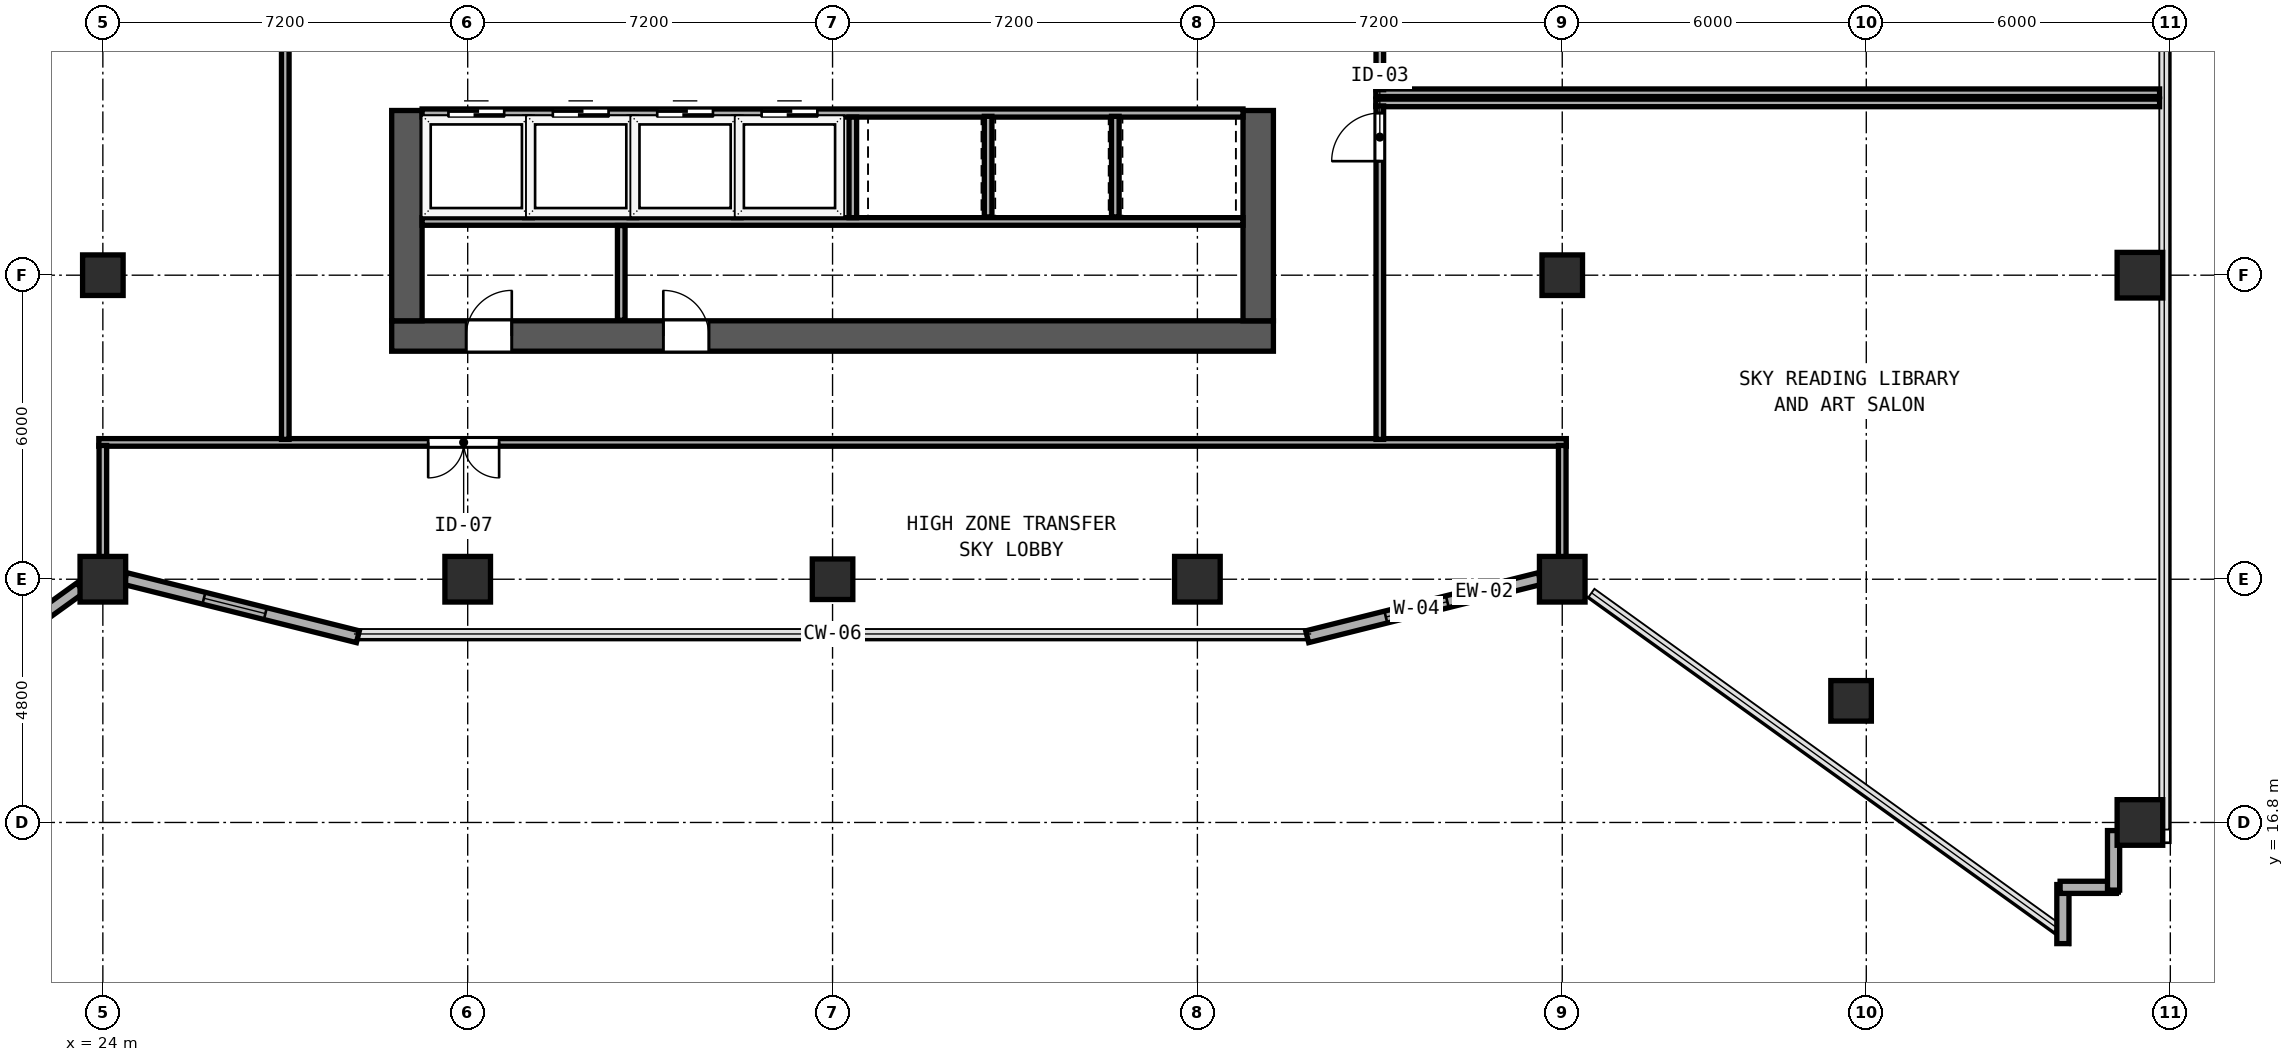
"""IFC4 building model, lengths in metres.
Left out: names, types, materials, properties, quantities, classifications, styles, units other than length and angle.
Written with IfcOpenShell. Run it as: python <this file> out.ifc"""

import sys

from ifc_helpers import new_model, si_unit, direction, frame, frame_2d, origin, origin_2d, place, context, subcontext, project, spatial, rectangle, hollow_rectangle, extrude, element, fill, save


model = new_model("IFC4")
c1 = context("Model", 3, precision=1e-05, world=origin(), true_north=direction((0.0, 1.0)))
c2 = subcontext(c1, "Body", "Model", "MODEL_VIEW")
j1 = project(units=[si_unit("LENGTHUNIT", "METRE"), si_unit("PLANEANGLEUNIT", "RADIAN")], contexts=[c1])
p1 = place(None, origin())
s1 = spatial("IfcSite", under=j1, at=p1, CompositionType="ELEMENT")
p2 = place(p1, origin())
s2 = spatial("IfcBuilding", under=s1, at=p2, CompositionType="ELEMENT")
p3 = place(p2, frame((0.0, 0.0, 164.6)))
s3 = spatial("IfcBuildingStorey", under=s2, at=p3, CompositionType="ELEMENT", Elevation=164.6)
p4 = place(p3, frame((29.7, 26.4, 0.0), z_axis=(0.0, 0.0, 1.0), x_axis=(1.0, 0.0, 0.0)))
e1 = element("IfcWall", 1, at=p4, inside=s3, PredefinedType="SHEAR", context=c2, shape_type="SweptSolid", body=[
    extrude(rectangle(XDim=17.4, YDim=0.6, at=frame_2d((8.7, 0.0))), origin(), (0.0, 0.0, 1.0), 4.22),
])
p5 = place(p4, frame((2.37, 0.0, 0.0), z_axis=(0.0, 0.0, 1.0), x_axis=(-1.0, 0.0, 0.0)))
e2 = element("IfcOpeningElement", 2, at=p5, cuts=e1, PredefinedType="OPENING", context=c2, shape_type="SweptSolid", body=[
    extrude(rectangle(XDim=0.9, YDim=2.1, at=frame_2d((0.45, 1.05))), frame((0.0, 0.31, 0.0), z_axis=(0.0, -1.0, 0.0), x_axis=(1.0, 0.0, 0.0)), (0.0, 0.0, 1.0), 0.62),
])
p6 = place(p4, frame((6.26, 0.0, 0.0), z_axis=(0.0, 0.0, 1.0), x_axis=(-1.0, 0.0, 0.0)))
e3 = element("IfcOpeningElement", 3, at=p6, cuts=e1, PredefinedType="OPENING", context=c2, shape_type="SweptSolid", body=[
    extrude(rectangle(XDim=0.9, YDim=2.1, at=frame_2d((0.45, 1.05))), frame((0.0, 0.31, 0.0), z_axis=(0.0, -1.0, 0.0), x_axis=(1.0, 0.0, 0.0)), (0.0, 0.0, 1.0), 0.62),
])
for number, where, z_axis, x_axis in (
    (4, (30.0, 26.7, 0.0), (0.0, 0.0, 1.0), (0.0, 1.0, 0.0)),
    (5, (46.8, 26.7, 0.0), (0.0, 0.0, 1.0), (0.0, 1.0, 0.0)),
):
    element("IfcWall", number, at=place(p3, frame(where, z_axis=z_axis, x_axis=x_axis)), inside=s3, PredefinedType="SHEAR", context=c2, shape_type="SweptSolid", body=[
        extrude(rectangle(XDim=4.15, YDim=0.6, at=frame_2d((2.075, 0.0))), origin(), (0.0, 0.0, 1.0), 4.22),
    ])
for number, where, z_axis, x_axis in (
    (6, (24.0, 21.6, 0.0), (0.0, 0.0, 1.0), (1.0, 0.0, 0.0)),
    (7, (52.8, 21.6, 0.0), (0.0, 0.0, 1.0), (1.0, 0.0, 0.0)),
    (8, (31.2, 21.6, 0.0), (0.0, 0.0, 1.0), (1.0, 0.0, 0.0)),
    (9, (45.6, 21.6, 0.0), (0.0, 0.0, 1.0), (1.0, 0.0, 0.0)),
    (10, (64.2, 16.8, 0.0), (0.0, 0.0, 1.0), (1.0, 0.0, 0.0)),
    (11, (64.2, 27.6, 0.0), (0.0, 0.0, 1.0), (1.0, 0.0, 0.0)),
):
    element("IfcColumn", number, at=place(p3, frame(where, z_axis=z_axis, x_axis=x_axis)), inside=s3, PredefinedType="COLUMN", context=c2, shape_type="SweptSolid", body=[
        extrude(hollow_rectangle(XDim=0.9, YDim=0.9, WallThickness=0.034, at=origin_2d()), origin(), (0.0, 0.0, 1.0), 4.4),
    ])
for number, where, z_axis, x_axis in (
    (12, (24.0, 27.6, 0.0), (0.0, 0.0, 1.0), (1.0, 0.0, 0.0)),
    (13, (52.8, 27.6, 0.0), (0.0, 0.0, 1.0), (1.0, 0.0, 0.0)),
    (14, (38.4, 21.6, 0.0), (0.0, 0.0, 1.0), (1.0, 0.0, 0.0)),
    (15, (58.5, 19.2, 0.0), (0.0, 0.0, 1.0), (1.0, 0.0, 0.0)),
):
    element("IfcColumn", number, at=place(p3, frame(where, z_axis=z_axis, x_axis=x_axis)), inside=s3, PredefinedType="COLUMN", context=c2, shape_type="SweptSolid", body=[
        extrude(hollow_rectangle(XDim=0.8, YDim=0.8, WallThickness=0.03, at=origin_2d()), origin(), (0.0, 0.0, 1.0), 4.4),
    ])
p7 = place(p3, frame((47.767, 20.465, 0.0), z_axis=(0.0, 0.0, 1.0), x_axis=(0.9701333955, 0.242572040715, 0.0)))
e16 = element("IfcWall", 16, at=p7, inside=s3, PredefinedType="SOLIDWALL", context=c2, shape_type="SweptSolid", body=[
    extrude(rectangle(XDim=4.732, YDim=0.24, at=frame_2d((2.366, 0.0))), origin(), (0.0, 0.0, 1.0), 3.815),
])
p8 = place(p7, frame((1.6, 0.0, 0.85)))
e17 = element("IfcOpeningElement", 17, at=p8, cuts=e16, PredefinedType="OPENING", context=c2, shape_type="SweptSolid", body=[
    extrude(rectangle(XDim=1.25, YDim=1.95, at=frame_2d((0.625, 0.975))), frame((0.0, 0.13, 0.0), z_axis=(0.0, -1.0, 0.0), x_axis=(1.0, 0.0, 0.0)), (0.0, 0.0, 1.0), 0.26),
])
p9 = place(p3, frame((62.68, 14.409, 0.0), z_axis=(0.0, 0.0, 1.0), x_axis=(0.0, 1.0, 0.0)))
e18 = element("IfcWall", 18, at=p9, inside=s3, PredefinedType="SOLIDWALL", context=c2, shape_type="SweptSolid", body=[
    extrude(rectangle(XDim=1.166, YDim=0.24, at=frame_2d((0.583, 0.0))), origin(), (0.0, 0.0, 1.0), 4.22),
])
p10 = place(p3, frame((62.625, 15.52, 0.0), z_axis=(0.0, 0.0, 1.0), x_axis=(1.0, 0.0, 0.0)))
e19 = element("IfcWall", 19, at=p10, inside=s3, PredefinedType="SOLIDWALL", context=c2, shape_type="SweptSolid", body=[
    extrude(rectangle(XDim=1.11, YDim=0.24, at=frame_2d((0.555, 0.0))), origin(), (0.0, 0.0, 1.0), 4.22),
])
p11 = place(p3, frame((63.68, 15.465, 0.0), z_axis=(0.0, 0.0, 1.0), x_axis=(0.0, 1.0, 0.0)))
e20 = element("IfcWall", 20, at=p11, inside=s3, PredefinedType="SOLIDWALL", context=c2, shape_type="SweptSolid", body=[
    extrude(rectangle(XDim=1.175, YDim=0.24, at=frame_2d((0.587, 0.0))), origin(), (0.0, 0.0, 1.0), 4.22),
])
p12 = place(p3, frame((14.075, 14.602, 0.0), z_axis=(0.0, 0.0, 1.0), x_axis=(0.811539493337, 0.584297570381, 0.0)))
e21 = element("IfcWall", 21, at=p12, inside=s3, PredefinedType="SOLIDWALL", context=c2, shape_type="SweptSolid", body=[
    extrude(rectangle(XDim=11.685, YDim=0.24, at=frame_2d((5.842, 0.0))), origin(), (0.0, 0.0, 1.0), 3.815),
])
p13 = place(p12, frame((1.6, 0.0, 0.85)))
e22 = element("IfcOpeningElement", 22, at=p13, cuts=e21, PredefinedType="OPENING", context=c2, shape_type="SweptSolid", body=[
    extrude(rectangle(XDim=1.25, YDim=1.95, at=frame_2d((0.625, 0.975))), frame((0.0, 0.13, 0.0), z_axis=(0.0, -1.0, 0.0), x_axis=(1.0, 0.0, 0.0)), (0.0, 0.0, 1.0), 0.26),
])
p14 = place(p12, frame((7.0, 0.0, 0.85)))
e23 = element("IfcOpeningElement", 23, at=p14, cuts=e21, PredefinedType="OPENING", context=c2, shape_type="SweptSolid", body=[
    extrude(rectangle(XDim=1.25, YDim=1.95, at=frame_2d((0.625, 0.975))), frame((0.0, 0.13, 0.0), z_axis=(0.0, -1.0, 0.0), x_axis=(1.0, 0.0, 0.0)), (0.0, 0.0, 1.0), 0.26),
])
p15 = place(p3, frame((24.442, 21.613, 0.0), z_axis=(0.0, 0.0, 1.0), x_axis=(0.970136430837, -0.242559900978, 0.0)))
e24 = element("IfcWall", 24, at=p15, inside=s3, PredefinedType="SOLIDWALL", context=c2, shape_type="SweptSolid", body=[
    extrude(rectangle(XDim=4.733, YDim=0.24, at=frame_2d((2.366, 0.0))), origin(), (0.0, 0.0, 1.0), 3.815),
])
p16 = place(p15, frame((1.6, 0.0, 0.85)))
e25 = element("IfcOpeningElement", 25, at=p16, cuts=e24, PredefinedType="OPENING", context=c2, shape_type="SweptSolid", body=[
    extrude(rectangle(XDim=1.25, YDim=1.95, at=frame_2d((0.625, 0.975))), frame((0.0, 0.13, 0.0), z_axis=(0.0, -1.0, 0.0), x_axis=(1.0, 0.0, 0.0)), (0.0, 0.0, 1.0), 0.26),
])
p17 = place(p3, frame((30.3, 30.8, 0.0), z_axis=(0.0, 0.0, 1.0), x_axis=(1.0, 0.0, 0.0)))
e26 = element("IfcWall", 26, at=p17, inside=s3, PredefinedType="SOLIDWALL", context=c2, shape_type="SweptSolid", body=[
    extrude(rectangle(XDim=16.2, YDim=0.16, at=frame_2d((8.1, 0.0))), origin(), (0.0, 0.0, 1.0), 4.22),
])
p18 = place(p17, frame((0.52, 0.0, 0.0)))
e27 = element("IfcOpeningElement", 27, at=p18, cuts=e26, PredefinedType="OPENING", context=c2, shape_type="SweptSolid", body=[
    extrude(rectangle(XDim=1.1, YDim=2.2, at=frame_2d((0.55, 1.1))), frame((0.0, 0.09, 0.0), z_axis=(0.0, -1.0, 0.0), x_axis=(1.0, 0.0, 0.0)), (0.0, 0.0, 1.0), 0.18),
])
p19 = place(p17, frame((2.58, 0.0, 0.0)))
e28 = element("IfcOpeningElement", 28, at=p19, cuts=e26, PredefinedType="OPENING", context=c2, shape_type="SweptSolid", body=[
    extrude(rectangle(XDim=1.1, YDim=2.2, at=frame_2d((0.55, 1.1))), frame((0.0, 0.09, 0.0), z_axis=(0.0, -1.0, 0.0), x_axis=(1.0, 0.0, 0.0)), (0.0, 0.0, 1.0), 0.18),
])
p20 = place(p17, frame((4.64, 0.0, 0.0)))
e29 = element("IfcOpeningElement", 29, at=p20, cuts=e26, PredefinedType="OPENING", context=c2, shape_type="SweptSolid", body=[
    extrude(rectangle(XDim=1.1, YDim=2.2, at=frame_2d((0.55, 1.1))), frame((0.0, 0.09, 0.0), z_axis=(0.0, -1.0, 0.0), x_axis=(1.0, 0.0, 0.0)), (0.0, 0.0, 1.0), 0.18),
])
p21 = place(p17, frame((6.7, 0.0, 0.0)))
e30 = element("IfcOpeningElement", 30, at=p21, cuts=e26, PredefinedType="OPENING", context=c2, shape_type="SweptSolid", body=[
    extrude(rectangle(XDim=1.1, YDim=2.2, at=frame_2d((0.55, 1.1))), frame((0.0, 0.09, 0.0), z_axis=(0.0, -1.0, 0.0), x_axis=(1.0, 0.0, 0.0)), (0.0, 0.0, 1.0), 0.18),
])
p22 = place(p3, frame((30.3, 28.66, 0.0), z_axis=(0.0, 0.0, 1.0), x_axis=(1.0, 0.0, 0.0)))
e31 = element("IfcWall", 31, at=p22, inside=s3, PredefinedType="PARTITIONING", context=c2, shape_type="SweptSolid", body=[
    extrude(rectangle(XDim=16.2, YDim=0.15, at=frame_2d((8.1, 0.0))), origin(), (0.0, 0.0, 1.0), 4.22),
])
for number, where, z_axis, x_axis in (
    (32, (32.4, 28.735, 0.0), (0.0, 0.0, 1.0), (0.0, 1.0, 0.0)),
    (33, (34.46, 28.735, 0.0), (0.0, 0.0, 1.0), (0.0, 1.0, 0.0)),
    (34, (36.52, 28.735, 0.0), (0.0, 0.0, 1.0), (0.0, 1.0, 0.0)),
    (35, (38.8, 28.735, 0.0), (0.0, 0.0, 1.0), (0.0, 1.0, 0.0)),
):
    element("IfcWall", number, at=place(p3, frame(where, z_axis=z_axis, x_axis=x_axis)), inside=s3, PredefinedType="SOLIDWALL", context=c2, shape_type="SweptSolid", body=[
        extrude(rectangle(XDim=1.985, YDim=0.15, at=frame_2d((0.992, 0.0))), origin(), (0.0, 0.0, 1.0), 4.22),
    ])
p23 = place(p3, frame((34.23, 26.71, 0.0), z_axis=(0.0, 0.0, 1.0), x_axis=(0.0, 1.0, 0.0)))
e36 = element("IfcWall", 36, at=p23, inside=s3, PredefinedType="PARTITIONING", context=c2, shape_type="SweptSolid", body=[
    extrude(rectangle(XDim=1.87, YDim=0.15, at=frame_2d((0.935, 0.0))), origin(), (0.0, 0.0, 1.0), 4.22),
])
for number, where, z_axis, x_axis in (
    (37, (41.47, 28.75, 0.0), (0.0, 0.0, 1.0), (0.0, 1.0, 0.0)),
    (38, (43.98, 28.75, 0.0), (0.0, 0.0, 1.0), (0.0, 1.0, 0.0)),
):
    element("IfcWall", number, at=place(p3, frame(where, z_axis=z_axis, x_axis=x_axis)), inside=s3, PredefinedType="SOLIDWALL", context=c2, shape_type="SweptSolid", body=[
        extrude(rectangle(XDim=1.985, YDim=0.15, at=frame_2d((0.993, 0.0))), origin(), (0.0, 0.0, 1.0), 4.22),
    ])
p24 = place(p3, frame((23.92, 24.3, 0.0), z_axis=(0.0, 0.0, 1.0), x_axis=(1.0, 0.0, 0.0)))
e39 = element("IfcWall", 39, at=p24, inside=s3, PredefinedType="PARTITIONING", context=c2, shape_type="SweptSolid", body=[
    extrude(rectangle(XDim=28.96, YDim=0.15, at=frame_2d((14.48, 0.0))), origin(), (0.0, 0.0, 1.0), 4.22),
])
p25 = place(p24, frame((7.9, 0.0, 0.0), z_axis=(0.0, 0.0, 1.0), x_axis=(-1.0, 0.0, 0.0)))
e40 = element("IfcOpeningElement", 40, at=p25, cuts=e39, PredefinedType="OPENING", context=c2, shape_type="SweptSolid", body=[
    extrude(rectangle(XDim=1.4, YDim=2.18, at=frame_2d((0.7, 1.09))), frame((0.0, 0.085, 0.0), z_axis=(0.0, -1.0, 0.0), x_axis=(1.0, 0.0, 0.0)), (0.0, 0.0, 1.0), 0.17),
])
for number, where, z_axis, x_axis in (
    (41, (24.0, 21.819, 0.0), (0.0, 0.0, 1.0), (0.0, 1.0, 0.0)),
    (42, (52.8, 21.819, 0.0), (0.0, 0.0, 1.0), (0.0, 1.0, 0.0)),
):
    element("IfcWall", number, at=place(p3, frame(where, z_axis=z_axis, x_axis=x_axis)), inside=s3, PredefinedType="PARTITIONING", context=c2, shape_type="SweptSolid", body=[
        extrude(rectangle(XDim=2.421, YDim=0.15, at=frame_2d((1.211, 0.0))), origin(), (0.0, 0.0, 1.0), 3.815),
    ])
p26 = place(p3, frame((27.6, 24.36, 0.0), z_axis=(0.0, 0.0, 1.0), x_axis=(0.0, 1.0, 0.0)))
e43 = element("IfcWall", 43, at=p26, inside=s3, PredefinedType="PARTITIONING", context=c2, shape_type="SweptSolid", body=[
    extrude(rectangle(XDim=20.58, YDim=0.15, at=frame_2d((10.29, 0.0))), origin(), (0.0, 0.0, 1.0), 4.22),
])
p27 = place(p26, frame((14.188, 0.0, 0.0), z_axis=(0.0, 0.0, 1.0), x_axis=(-1.0, 0.0, 0.0)))
e44 = element("IfcOpeningElement", 44, at=p27, cuts=e43, PredefinedType="OPENING", context=c2, shape_type="SweptSolid", body=[
    extrude(rectangle(XDim=1.4, YDim=2.18, at=frame_2d((0.7, 1.09))), frame((0.0, 0.085, 0.0), z_axis=(0.0, -1.0, 0.0), x_axis=(1.0, 0.0, 0.0)), (0.0, 0.0, 1.0), 0.17),
])
p28 = place(p3, frame((49.12, 31.0, 0.0), z_axis=(0.0, 0.0, 1.0), x_axis=(1.0, 0.0, 0.0)))
e45 = element("IfcWall", 45, at=p28, inside=s3, PredefinedType="PARTITIONING", context=c2, shape_type="SweptSolid", body=[
    extrude(rectangle(XDim=15.468, YDim=0.15, at=frame_2d((7.734, 0.0))), origin(), (0.0, 0.0, 1.0), 4.22),
])
p29 = place(p3, frame((49.2, 24.36, 0.0), z_axis=(0.0, 0.0, 1.0), x_axis=(0.0, 1.0, 0.0)))
e46 = element("IfcWall", 46, at=p29, inside=s3, PredefinedType="PARTITIONING", context=c2, shape_type="SweptSolid", body=[
    extrude(rectangle(XDim=6.58, YDim=0.15, at=frame_2d((3.29, 0.0))), origin(), (0.0, 0.0, 1.0), 4.22),
])
p30 = place(p29, frame((5.49, 0.0, 0.0)))
e47 = element("IfcOpeningElement", 47, at=p30, cuts=e46, PredefinedType="OPENING", context=c2, shape_type="SweptSolid", body=[
    extrude(rectangle(XDim=0.95, YDim=2.12, at=frame_2d((0.475, 1.06))), frame((0.0, 0.085, 0.0), z_axis=(0.0, -1.0, 0.0), x_axis=(1.0, 0.0, 0.0)), (0.0, 0.0, 1.0), 0.17),
])
p31 = place(p3, frame((49.12, 31.2, 0.0), z_axis=(0.0, 0.0, 1.0), x_axis=(1.0, 0.0, 0.0)))
e48 = element("IfcWall", 48, at=p31, inside=s3, PredefinedType="PARTITIONING", context=c2, shape_type="SweptSolid", body=[
    extrude(rectangle(XDim=15.468, YDim=0.15, at=frame_2d((7.734, 0.0))), origin(), (0.0, 0.0, 1.0), 4.22),
])
p32 = place(p3, frame((49.2, 31.26, 0.0), z_axis=(0.0, 0.0, 1.0), x_axis=(0.0, 1.0, 0.0)))
e49 = element("IfcWall", 49, at=p32, inside=s3, PredefinedType="PARTITIONING", context=c2, shape_type="SweptSolid", body=[
    extrude(rectangle(XDim=13.82, YDim=0.15, at=frame_2d((6.91, 0.0))), origin(), (0.0, 0.0, 1.0), 4.22),
])
p33 = place(p32, frame((3.86, 0.0, 0.0)))
e50 = element("IfcOpeningElement", 50, at=p33, cuts=e49, PredefinedType="OPENING", context=c2, shape_type="SweptSolid", body=[
    extrude(rectangle(XDim=0.95, YDim=2.12, at=frame_2d((0.475, 1.06))), frame((0.0, 0.085, 0.0), z_axis=(0.0, -1.0, 0.0), x_axis=(1.0, 0.0, 0.0)), (0.0, 0.0, 1.0), 0.17),
])
p34 = place(p8, origin())
e51 = element("IfcWindow", 51, at=p34, inside=s3, PartitioningType="SINGLE_PANEL", PredefinedType="WINDOW", context=c2, shape_type="SweptSolid", body=[
    extrude(rectangle(XDim=1.25, YDim=1.95, at=frame_2d((0.625, 0.975))), frame((0.0, 0.03, 0.0), z_axis=(0.0, -1.0, 0.0), x_axis=(1.0, 0.0, 0.0)), (0.0, 0.0, 1.0), 0.06),
])
fill(e17, e51)
p35 = place(p16, origin())
e52 = element("IfcWindow", 52, at=p35, inside=s3, PartitioningType="SINGLE_PANEL", PredefinedType="WINDOW", context=c2, shape_type="SweptSolid", body=[
    extrude(rectangle(XDim=1.25, YDim=1.95, at=frame_2d((0.625, 0.975))), frame((0.0, 0.03, 0.0), z_axis=(0.0, -1.0, 0.0), x_axis=(1.0, 0.0, 0.0)), (0.0, 0.0, 1.0), 0.06),
])
fill(e25, e52)
p36 = place(p18, origin())
e53 = element("IfcDoor", 53, at=p36, inside=s3, OperationType="SLIDING_TO_LEFT", PredefinedType="DOOR", context=c2, shape_type="SweptSolid", body=[
    extrude(rectangle(XDim=1.1, YDim=2.2, at=frame_2d((0.55, 1.1))), frame((0.0, 0.025, 0.0), z_axis=(0.0, -1.0, 0.0), x_axis=(1.0, 0.0, 0.0)), (0.0, 0.0, 1.0), 0.05),
])
fill(e27, e53)
p37 = place(p19, origin())
e54 = element("IfcDoor", 54, at=p37, inside=s3, OperationType="SLIDING_TO_LEFT", PredefinedType="DOOR", context=c2, shape_type="SweptSolid", body=[
    extrude(rectangle(XDim=1.1, YDim=2.2, at=frame_2d((0.55, 1.1))), frame((0.0, 0.025, 0.0), z_axis=(0.0, -1.0, 0.0), x_axis=(1.0, 0.0, 0.0)), (0.0, 0.0, 1.0), 0.05),
])
fill(e28, e54)
p38 = place(p20, origin())
e55 = element("IfcDoor", 55, at=p38, inside=s3, OperationType="SLIDING_TO_LEFT", PredefinedType="DOOR", context=c2, shape_type="SweptSolid", body=[
    extrude(rectangle(XDim=1.1, YDim=2.2, at=frame_2d((0.55, 1.1))), frame((0.0, 0.025, 0.0), z_axis=(0.0, -1.0, 0.0), x_axis=(1.0, 0.0, 0.0)), (0.0, 0.0, 1.0), 0.05),
])
fill(e29, e55)
p39 = place(p21, origin())
e56 = element("IfcDoor", 56, at=p39, inside=s3, OperationType="SLIDING_TO_LEFT", PredefinedType="DOOR", context=c2, shape_type="SweptSolid", body=[
    extrude(rectangle(XDim=1.1, YDim=2.2, at=frame_2d((0.55, 1.1))), frame((0.0, 0.025, 0.0), z_axis=(0.0, -1.0, 0.0), x_axis=(1.0, 0.0, 0.0)), (0.0, 0.0, 1.0), 0.05),
])
fill(e30, e56)
p40 = place(p5, origin())
e57 = element("IfcDoor", 57, at=p40, inside=s3, OperationType="SINGLE_SWING_LEFT", PredefinedType="DOOR", context=c2, shape_type="SweptSolid", body=[
    extrude(rectangle(XDim=0.9, YDim=2.1, at=frame_2d((0.45, 1.05))), frame((0.0, -0.195, 0.0), z_axis=(0.0, -1.0, 0.0), x_axis=(1.0, 0.0, 0.0)), (0.0, 0.0, 1.0), 0.05),
])
fill(e2, e57)
p41 = place(p6, origin())
e58 = element("IfcDoor", 58, at=p41, inside=s3, OperationType="SINGLE_SWING_RIGHT", PredefinedType="DOOR", context=c2, shape_type="SweptSolid", body=[
    extrude(rectangle(XDim=0.9, YDim=2.1, at=frame_2d((0.45, 1.05))), frame((0.0, -0.195, 0.0), z_axis=(0.0, -1.0, 0.0), x_axis=(1.0, 0.0, 0.0)), (0.0, 0.0, 1.0), 0.05),
])
fill(e3, e58)
p42 = place(p25, origin())
e59 = element("IfcDoor", 59, at=p42, inside=s3, OperationType="DOUBLE_DOOR_SINGLE_SWING", PredefinedType="DOOR", context=c2, shape_type="SweptSolid", body=[
    extrude(rectangle(XDim=1.4, YDim=2.18, at=frame_2d((0.7, 1.09))), frame((0.0, 0.025, 0.0), z_axis=(0.0, -1.0, 0.0), x_axis=(1.0, 0.0, 0.0)), (0.0, 0.0, 1.0), 0.05),
])
fill(e40, e59)
p43 = place(p30, origin())
e60 = element("IfcDoor", 60, at=p43, inside=s3, OperationType="SINGLE_SWING_LEFT", PredefinedType="DOOR", context=c2, shape_type="SweptSolid", body=[
    extrude(rectangle(XDim=0.95, YDim=2.12, at=frame_2d((0.475, 1.06))), frame((0.0, 0.025, 0.0), z_axis=(0.0, -1.0, 0.0), x_axis=(1.0, 0.0, 0.0)), (0.0, 0.0, 1.0), 0.05),
])
fill(e47, e60)
save(model, sys.argv[1])
